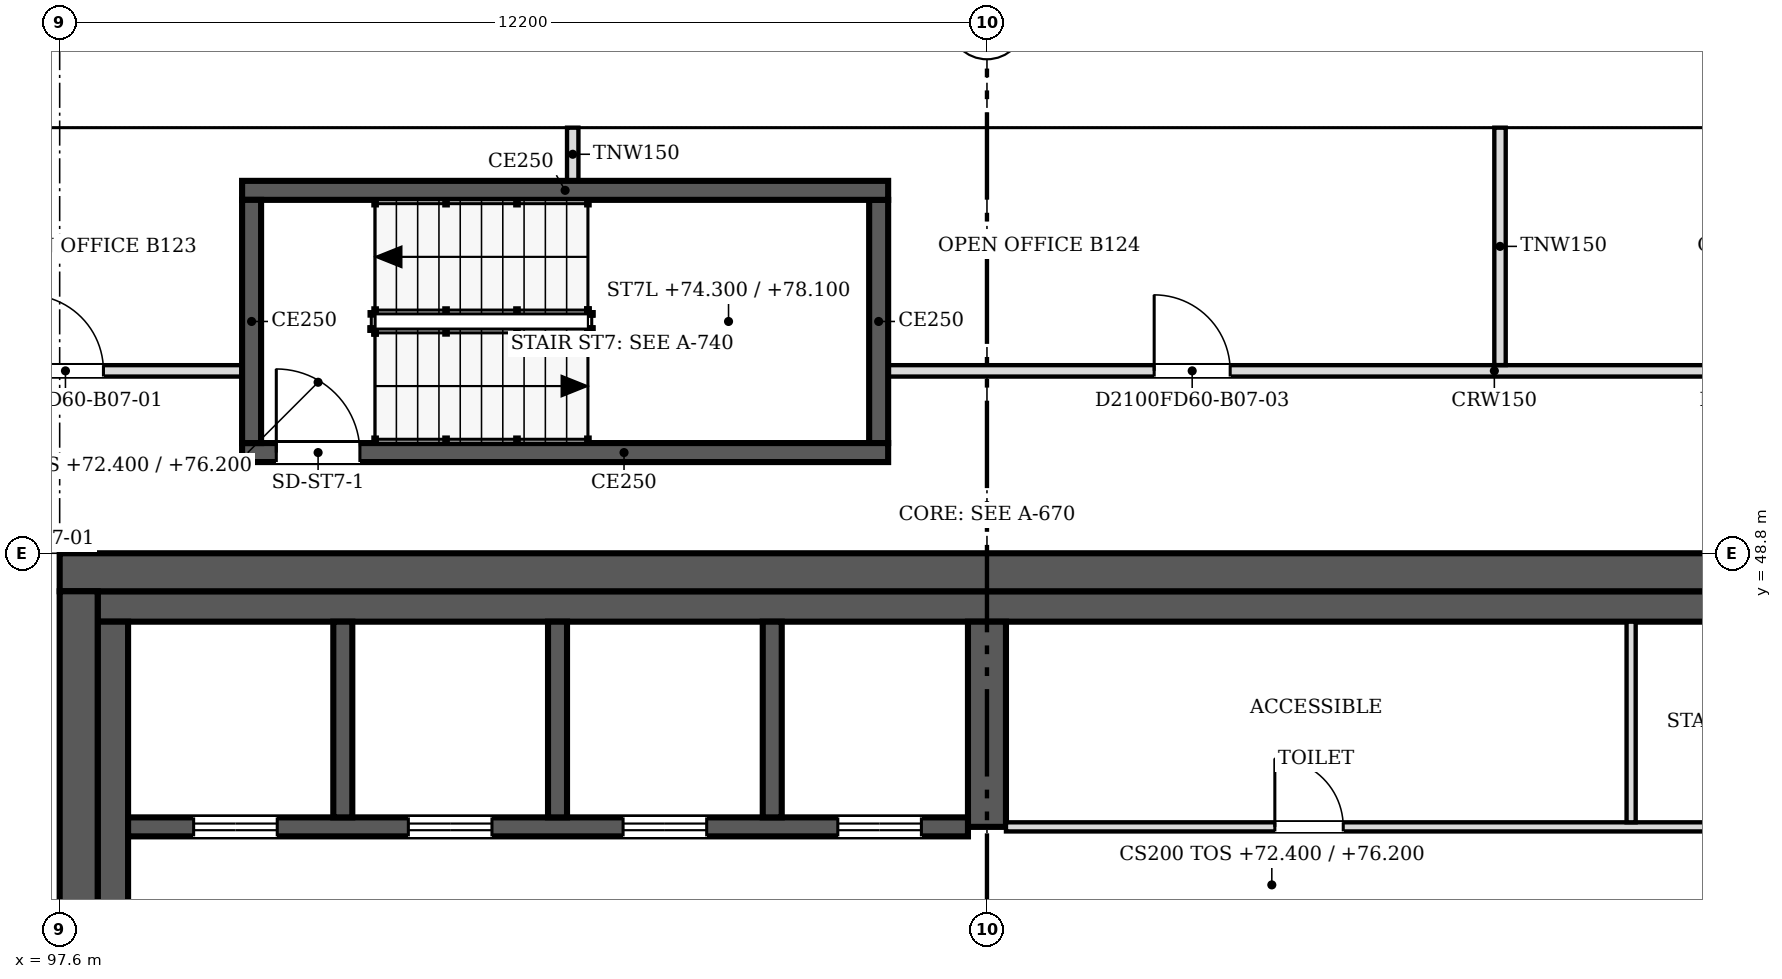
"""IFC4 building model, lengths in metres.
Left out: names, types, materials, properties, quantities, classifications, styles, units other than length and angle.
Written with IfcOpenShell. Run it as: python <this file> out.ifc"""

import sys

from ifc_helpers import new_model, si_unit, direction, frame, frame_2d, origin, place, context, subcontext, project, spatial, polyline, rectangle, outline, extrude, faceted_brep, source, transform, mapped, element, fill, save


model = new_model("IFC4")
c1 = context("Model", 3, precision=1e-05, world=origin(), true_north=direction((0.0, 1.0)))
c2 = subcontext(c1, "Body", "Model", "MODEL_VIEW")
j1 = project(units=[si_unit("LENGTHUNIT", "METRE"), si_unit("PLANEANGLEUNIT", "RADIAN")], contexts=[c1])
p1 = place(None, origin())
s1 = spatial("IfcSite", under=j1, at=p1, CompositionType="ELEMENT")
p2 = place(p1, origin())
s2 = spatial("IfcBuilding", under=s1, at=p2, CompositionType="ELEMENT")
p3 = place(p2, frame((0.0, 0.0, 72.4)))
s3 = spatial("IfcBuildingStorey", under=s2, at=p3, CompositionType="ELEMENT", Elevation=72.4)
m1 = source(origin(), c2, "Body", "SweptSolid", [
    extrude(outline(polyline([(3.05, 0.0), (6.1, 3.8), (3.05, 7.6), (0.0, 3.8), (3.05, 0.0)])), frame((0.0, 0.25, 0.0), z_axis=(0.0, -1.0, 0.0), x_axis=(1.0, 0.0, 0.0)), (0.0, 0.0, 1.0), 0.5),
])
p4 = place(p3, frame((122.0, 54.65, -3.8), z_axis=(0.0, 0.0, 1.0), x_axis=(-1.0, 0.0, 0.0)))
e1 = element("IfcWall", 1, at=p4, inside=s3, PredefinedType="SOLIDWALL", context=c2, shape_type="MappedRepresentation", body=[
    mapped(m1, transform((0.0, 0.0, 0.0), scale=1.0)),
])
m2 = source(origin(), c2, "Body", "SweptSolid", [
    extrude(outline(polyline([(3.05, 0.399), (5.78, 3.8), (3.05, 7.2), (0.321, 3.8), (3.05, 0.399)])), frame((0.0, 0.26, 0.0), z_axis=(0.0, -1.0, 0.0), x_axis=(1.0, 0.0, 0.0)), (0.0, 0.0, 1.0), 0.52),
])
p5 = place(p4, origin())
e2 = element("IfcOpeningElement", 2, at=p5, cuts=e1, PredefinedType="OPENING", context=c2, shape_type="MappedRepresentation", body=[
    mapped(m2, transform((0.0, 0.0, 0.0), scale=1.0)),
])
m3 = source(origin(), c2, "Body", "Brep", [
    faceted_brep([(3.05, -0.25, 0.0), (6.1, -0.25, 3.8), (6.1, -0.25, 3.8), (3.05, -0.25, 7.6), (0.0, -0.25, 3.8), (0.0, 0.25, 3.8), (3.05, 0.25, 7.6), (6.1, 0.25, 3.8), (6.1, 0.25, 3.8), (3.05, 0.25, 0.0)], [[[0, 1, 2, 3, 4]], [[5, 6, 7, 8, 9]], [[9, 8, 1, 0]], [[7, 6, 3, 2]], [[6, 5, 4, 3]], [[5, 9, 0, 4]], [[1, 8, 7, 2]]]),
])
p6 = place(p3, frame((115.9, 54.65, -3.8), z_axis=(0.0, 0.0, 1.0), x_axis=(-1.0, 0.0, 0.0)))
e3 = element("IfcWall", 3, at=p6, inside=s3, PredefinedType="SOLIDWALL", context=c2, shape_type="MappedRepresentation", body=[
    mapped(m3, transform((0.0, 0.0, 0.0), scale=1.0)),
])
p7 = place(p6, origin())
e4 = element("IfcOpeningElement", 4, at=p7, cuts=e3, PredefinedType="OPENING", context=c2, shape_type="MappedRepresentation", body=[
    mapped(m2, transform((0.0, 0.0, 0.0), scale=1.0)),
])
p8 = place(p3, frame((109.8, 54.65, -3.8), z_axis=(0.0, 0.0, 1.0), x_axis=(-1.0, 0.0, 0.0)))
e5 = element("IfcWall", 5, at=p8, inside=s3, PredefinedType="SOLIDWALL", context=c2, shape_type="MappedRepresentation", body=[
    mapped(m1, transform((0.0, 0.0, 0.0), scale=1.0)),
])
p9 = place(p8, origin())
e6 = element("IfcOpeningElement", 6, at=p9, cuts=e5, PredefinedType="OPENING", context=c2, shape_type="MappedRepresentation", body=[
    mapped(m2, transform((0.0, 0.0, 0.0), scale=1.0)),
])
p10 = place(p3, frame((103.7, 54.65, -3.8), z_axis=(0.0, 0.0, 1.0), x_axis=(-1.0, 0.0, 0.0)))
e7 = element("IfcWall", 7, at=p10, inside=s3, PredefinedType="SOLIDWALL", context=c2, shape_type="MappedRepresentation", body=[
    mapped(m3, transform((0.0, 0.0, 0.0), scale=1.0)),
])
p11 = place(p10, origin())
e8 = element("IfcOpeningElement", 8, at=p11, cuts=e7, PredefinedType="OPENING", context=c2, shape_type="MappedRepresentation", body=[
    mapped(m2, transform((0.0, 0.0, 0.0), scale=1.0)),
])
m4 = source(origin(), c2, "Body", "Brep", [
    faceted_brep([(3.05, -0.25, 0.0), (6.053, -0.25, 3.8), (3.05, -0.25, 7.6), (0.0, -0.25, 3.8), (0.0, 0.25, 3.8), (3.05, 0.25, 7.6), (6.007, 0.25, 3.859), (6.007, 0.25, 3.741), (3.05, 0.25, 0.0), (6.053, 0.0, 3.8)], [[[0, 1, 2, 3]], [[4, 5, 6, 7, 8]], [[8, 7, 9, 1, 0]], [[6, 5, 2, 1, 9]], [[5, 4, 3, 2]], [[4, 8, 0, 3]], [[9, 7, 6]]]),
])
p12 = place(p3, frame((97.6, 54.65, -3.8), z_axis=(0.0, 0.0, 1.0), x_axis=(-1.0, 0.0, 0.0)))
e9 = element("IfcWall", 9, at=p12, inside=s3, PredefinedType="SOLIDWALL", context=c2, shape_type="MappedRepresentation", body=[
    mapped(m4, transform((0.0, 0.0, 0.0), scale=1.0)),
])
m5 = source(origin(), c2, "Body", "SweptSolid", [
    extrude(outline(polyline([(3.049, 0.401), (5.735, 3.8), (3.049, 7.199), (0.321, 3.8), (3.049, 0.401)])), frame((0.0, 0.26, 0.0), z_axis=(0.0, -1.0, 0.0), x_axis=(1.0, 0.0, 0.0)), (0.0, 0.0, 1.0), 0.52),
])
p13 = place(p12, origin())
e10 = element("IfcOpeningElement", 10, at=p13, cuts=e9, PredefinedType="OPENING", context=c2, shape_type="MappedRepresentation", body=[
    mapped(m5, transform((0.0, 0.0, 0.0), scale=1.0)),
])
p14 = place(p2, frame((0.0, 0.0, 76.2)))
s4 = spatial("IfcBuildingStorey", under=s2, at=p14, CompositionType="ELEMENT", Elevation=76.2)
m6 = source(origin(), c2, "Body", "SweptSolid", [
    extrude(outline(polyline([(3.05, 0.0), (6.1, 3.8), (3.05, 7.6), (0.0, 3.8), (3.05, 0.0)])), frame((0.0, 0.25, 0.0), z_axis=(0.0, -1.0, 0.0), x_axis=(1.0, 0.0, 0.0)), (0.0, 0.0, 1.0), 0.5),
])
p15 = place(p14, frame((125.05, 54.65, -3.8), z_axis=(0.0, 0.0, 1.0), x_axis=(-1.0, 0.0, 0.0)))
e11 = element("IfcWall", 11, at=p15, inside=s4, PredefinedType="SOLIDWALL", context=c2, shape_type="MappedRepresentation", body=[
    mapped(m6, transform((0.0, 0.0, 0.0), scale=1.0)),
])
m7 = source(origin(), c2, "Body", "SweptSolid", [
    extrude(outline(polyline([(3.05, 0.399), (5.78, 3.8), (3.05, 7.201), (0.321, 3.8), (3.05, 0.399)])), frame((0.0, 0.26, 0.0), z_axis=(0.0, -1.0, 0.0), x_axis=(1.0, 0.0, 0.0)), (0.0, 0.0, 1.0), 0.52),
])
p16 = place(p15, origin())
e12 = element("IfcOpeningElement", 12, at=p16, cuts=e11, PredefinedType="OPENING", context=c2, shape_type="MappedRepresentation", body=[
    mapped(m7, transform((0.0, 0.0, 0.0), scale=1.0)),
])
m8 = source(origin(), c2, "Body", "Brep", [
    faceted_brep([(3.05, -0.25, 0.0), (6.1, -0.25, 3.8), (6.1, -0.25, 3.8), (3.05, -0.25, 7.6), (0.0, -0.25, 3.8), (0.0, 0.25, 3.8), (3.05, 0.25, 7.6), (6.1, 0.25, 3.8), (6.1, 0.25, 3.8), (3.05, 0.25, 0.0)], [[[0, 1, 2, 3, 4]], [[5, 6, 7, 8, 9]], [[9, 8, 1, 0]], [[7, 6, 3, 2]], [[6, 5, 4, 3]], [[5, 9, 0, 4]], [[1, 8, 7, 2]]]),
])
p17 = place(p14, frame((118.95, 54.65, -3.8), z_axis=(0.0, 0.0, 1.0), x_axis=(-1.0, 0.0, 0.0)))
e13 = element("IfcWall", 13, at=p17, inside=s4, PredefinedType="SOLIDWALL", context=c2, shape_type="MappedRepresentation", body=[
    mapped(m8, transform((0.0, 0.0, 0.0), scale=1.0)),
])
p18 = place(p17, origin())
e14 = element("IfcOpeningElement", 14, at=p18, cuts=e13, PredefinedType="OPENING", context=c2, shape_type="MappedRepresentation", body=[
    mapped(m7, transform((0.0, 0.0, 0.0), scale=1.0)),
])
p19 = place(p14, frame((112.85, 54.65, -3.8), z_axis=(0.0, 0.0, 1.0), x_axis=(-1.0, 0.0, 0.0)))
e15 = element("IfcWall", 15, at=p19, inside=s4, PredefinedType="SOLIDWALL", context=c2, shape_type="MappedRepresentation", body=[
    mapped(m6, transform((0.0, 0.0, 0.0), scale=1.0)),
])
p20 = place(p19, origin())
e16 = element("IfcOpeningElement", 16, at=p20, cuts=e15, PredefinedType="OPENING", context=c2, shape_type="MappedRepresentation", body=[
    mapped(m7, transform((0.0, 0.0, 0.0), scale=1.0)),
])
p21 = place(p14, frame((106.75, 54.65, -3.8), z_axis=(0.0, 0.0, 1.0), x_axis=(-1.0, 0.0, 0.0)))
e17 = element("IfcWall", 17, at=p21, inside=s4, PredefinedType="SOLIDWALL", context=c2, shape_type="MappedRepresentation", body=[
    mapped(m6, transform((0.0, 0.0, 0.0), scale=1.0)),
])
p22 = place(p21, origin())
e18 = element("IfcOpeningElement", 18, at=p22, cuts=e17, PredefinedType="OPENING", context=c2, shape_type="MappedRepresentation", body=[
    mapped(m7, transform((0.0, 0.0, 0.0), scale=1.0)),
])
p23 = place(p14, frame((100.65, 54.65, -3.8), z_axis=(0.0, 0.0, 1.0), x_axis=(-1.0, 0.0, 0.0)))
e19 = element("IfcWall", 19, at=p23, inside=s4, PredefinedType="SOLIDWALL", context=c2, shape_type="MappedRepresentation", body=[
    mapped(m8, transform((0.0, 0.0, 0.0), scale=1.0)),
])
p24 = place(p23, origin())
e20 = element("IfcOpeningElement", 20, at=p24, cuts=e19, PredefinedType="OPENING", context=c2, shape_type="MappedRepresentation", body=[
    mapped(m7, transform((0.0, 0.0, 0.0), scale=1.0)),
])
p25 = place(p3, frame((97.85, 37.1, 0.0), z_axis=(0.0, 0.0, 1.0), x_axis=(0.0, 1.0, 0.0)))
e21 = element("IfcWall", 21, at=p25, inside=s3, PredefinedType="SHEAR", context=c2, shape_type="SweptSolid", body=[
    extrude(rectangle(XDim=11.2, YDim=0.5, at=frame_2d((5.6, 0.0))), origin(), (0.0, 0.0, 1.0), 3.8),
])
m9 = source(origin(), c2, "Body", "SweptSolid", [
    extrude(rectangle(XDim=2.1, YDim=2.4, at=frame_2d((1.05, 1.2))), frame((0.0, 0.26, 0.0), z_axis=(0.0, -1.0, 0.0), x_axis=(1.0, 0.0, 0.0)), (0.0, 0.0, 1.0), 0.52),
])
p26 = place(p25, frame((4.7, 0.0, 0.0)))
e22 = element("IfcOpeningElement", 22, at=p26, cuts=e21, PredefinedType="OPENING", context=c2, shape_type="MappedRepresentation", body=[
    mapped(m9, transform((0.0, 0.0, 0.0), scale=1.0)),
])
p27 = place(p3, frame((97.6, 48.55, 0.0), z_axis=(0.0, 0.0, 1.0), x_axis=(1.0, 0.0, 0.0)))
e23 = element("IfcWall", 23, at=p27, inside=s3, PredefinedType="SHEAR", context=c2, shape_type="SweptSolid", body=[
    extrude(rectangle(XDim=24.4, YDim=0.5, at=frame_2d((12.2, 0.0))), origin(), (0.0, 0.0, 1.0), 3.8),
])
p28 = place(p3, frame((98.1, 48.1, 0.0), z_axis=(0.0, 0.0, 1.0), x_axis=(1.0, 0.0, 0.0)))
e24 = element("IfcWall", 24, at=p28, inside=s3, PredefinedType="SOLIDWALL", context=c2, shape_type="SweptSolid", body=[
    extrude(rectangle(XDim=23.4, YDim=0.4, at=frame_2d((11.7, 0.0))), origin(), (0.0, 0.0, 1.0), 3.8),
])
p29 = place(p3, frame((98.3, 43.9, 0.0), z_axis=(0.0, 0.0, 1.0), x_axis=(0.0, 1.0, 0.0)))
e25 = element("IfcWall", 25, at=p29, inside=s3, PredefinedType="SOLIDWALL", context=c2, shape_type="SweptSolid", body=[
    extrude(rectangle(XDim=4.0, YDim=0.4, at=frame_2d((2.0, 0.0))), origin(), (0.0, 0.0, 1.0), 3.8),
])
p30 = place(p3, frame((109.8, 45.2, 0.0), z_axis=(0.0, 0.0, 1.0), x_axis=(0.0, 1.0, 0.0)))
e26 = element("IfcWall", 26, at=p30, inside=s3, PredefinedType="SHEAR", context=c2, shape_type="SweptSolid", body=[
    extrude(rectangle(XDim=2.7, YDim=0.5, at=frame_2d((1.35, 0.0))), origin(), (0.0, 0.0, 1.0), 3.8),
])
p31 = place(p3, frame((109.55, 45.2, 0.0), z_axis=(0.0, 0.0, 1.0), x_axis=(-1.0, 0.0, 0.0)))
e27 = element("IfcWall", 27, at=p31, inside=s3, PredefinedType="SOLIDWALL", context=c2, shape_type="SweptSolid", body=[
    extrude(rectangle(XDim=11.05, YDim=0.25, at=frame_2d((5.525, 0.0))), origin(), (0.0, 0.0, 1.0), 3.8),
])
m10 = source(origin(), c2, "Body", "SweptSolid", [
    extrude(rectangle(XDim=1.1, YDim=2.1, at=frame_2d((0.55, 1.05))), frame((0.0, 0.135, 0.0), z_axis=(0.0, -1.0, 0.0), x_axis=(1.0, 0.0, 0.0)), (0.0, 0.0, 1.0), 0.27),
])
p32 = place(p31, frame((9.087, 0.0, 0.0)))
e28 = element("IfcOpeningElement", 28, at=p32, cuts=e27, PredefinedType="OPENING", context=c2, shape_type="MappedRepresentation", body=[
    mapped(m10, transform((0.0, 0.0, 0.0), scale=1.0)),
])
p33 = place(p31, frame((6.262, 0.0, 0.0)))
e29 = element("IfcOpeningElement", 29, at=p33, cuts=e27, PredefinedType="OPENING", context=c2, shape_type="MappedRepresentation", body=[
    mapped(m10, transform((0.0, 0.0, 0.0), scale=1.0)),
])
p34 = place(p31, frame((3.438, 0.0, 0.0)))
e30 = element("IfcOpeningElement", 30, at=p34, cuts=e27, PredefinedType="OPENING", context=c2, shape_type="MappedRepresentation", body=[
    mapped(m10, transform((0.0, 0.0, 0.0), scale=1.0)),
])
p35 = place(p31, frame((0.613, 0.0, 0.0)))
e31 = element("IfcOpeningElement", 31, at=p35, cuts=e27, PredefinedType="OPENING", context=c2, shape_type="MappedRepresentation", body=[
    mapped(m10, transform((0.0, 0.0, 0.0), scale=1.0)),
])
for number, where, z_axis, x_axis in (
    (32, (101.325, 45.325, 0.0), (0.0, 0.0, 1.0), (0.0, 1.0, 0.0)),
    (33, (104.15, 45.325, 0.0), (0.0, 0.0, 1.0), (0.0, 1.0, 0.0)),
    (34, (106.975, 45.325, 0.0), (0.0, 0.0, 1.0), (0.0, 1.0, 0.0)),
):
    element("IfcWall", number, at=place(p3, frame(where, z_axis=z_axis, x_axis=x_axis)), inside=s3, PredefinedType="SOLIDWALL", context=c2, shape_type="SweptSolid", body=[
        extrude(rectangle(XDim=2.575, YDim=0.25, at=frame_2d((1.288, 0.0))), origin(), (0.0, 0.0, 1.0), 3.8),
    ])
p36 = place(p3, frame((110.05, 45.2, 0.0), z_axis=(0.0, 0.0, 1.0), x_axis=(1.0, 0.0, 0.0)))
e35 = element("IfcWall", 35, at=p36, inside=s3, PredefinedType="PARTITIONING", context=c2, shape_type="SweptSolid", body=[
    extrude(rectangle(XDim=11.05, YDim=0.12, at=frame_2d((5.525, 0.0))), origin(), (0.0, 0.0, 1.0), 3.6),
])
m11 = source(origin(), c2, "Body", "SweptSolid", [
    extrude(rectangle(XDim=0.9, YDim=2.1, at=frame_2d((0.45, 1.05))), frame((0.0, 0.07, 0.0), z_axis=(0.0, -1.0, 0.0), x_axis=(1.0, 0.0, 0.0)), (0.0, 0.0, 1.0), 0.14),
])
p37 = place(p36, frame((3.538, 0.0, 0.0)))
e36 = element("IfcOpeningElement", 36, at=p37, cuts=e35, PredefinedType="OPENING", context=c2, shape_type="MappedRepresentation", body=[
    mapped(m11, transform((0.0, 0.0, 0.0), scale=1.0)),
])
p38 = place(p36, frame((9.188, 0.0, 0.0)))
e37 = element("IfcOpeningElement", 37, at=p38, cuts=e35, PredefinedType="OPENING", context=c2, shape_type="MappedRepresentation", body=[
    mapped(m11, transform((0.0, 0.0, 0.0), scale=1.0)),
])
p39 = place(p3, frame((118.275, 45.26, 0.0), z_axis=(0.0, 0.0, 1.0), x_axis=(0.0, 1.0, 0.0)))
e38 = element("IfcWall", 38, at=p39, inside=s3, PredefinedType="PARTITIONING", context=c2, shape_type="SweptSolid", body=[
    extrude(rectangle(XDim=2.64, YDim=0.12, at=frame_2d((1.32, 0.0))), origin(), (0.0, 0.0, 1.0), 3.6),
])
p40 = place(p3, frame((108.5, 50.125, 0.0), z_axis=(0.0, 0.0, 1.0), x_axis=(-1.0, 0.0, 0.0)))
e39 = element("IfcWall", 39, at=p40, inside=s3, PredefinedType="SOLIDWALL", context=c2, shape_type="SweptSolid", body=[
    extrude(rectangle(XDim=8.5, YDim=0.25, at=frame_2d((4.25, 0.0))), origin(), (0.0, 0.0, 1.0), 3.8),
])
p41 = place(p40, frame((6.95, 0.0, 0.0)))
e40 = element("IfcOpeningElement", 40, at=p41, cuts=e39, PredefinedType="OPENING", context=c2, shape_type="MappedRepresentation", body=[
    mapped(m10, transform((0.0, 0.0, 0.0), scale=1.0)),
])
p42 = place(p3, frame((100.125, 50.25, 0.0), z_axis=(0.0, 0.0, 1.0), x_axis=(0.0, 1.0, 0.0)))
e41 = element("IfcWall", 41, at=p42, inside=s3, PredefinedType="SOLIDWALL", context=c2, shape_type="SweptSolid", body=[
    extrude(rectangle(XDim=3.2, YDim=0.25, at=frame_2d((1.6, 0.0))), origin(), (0.0, 0.0, 1.0), 3.8),
])
p43 = place(p3, frame((100.0, 53.575, 0.0), z_axis=(0.0, 0.0, 1.0), x_axis=(1.0, 0.0, 0.0)))
e42 = element("IfcWall", 42, at=p43, inside=s3, PredefinedType="SOLIDWALL", context=c2, shape_type="SweptSolid", body=[
    extrude(rectangle(XDim=8.5, YDim=0.25, at=frame_2d((4.25, 0.0))), origin(), (0.0, 0.0, 1.0), 3.8),
])
p44 = place(p3, frame((108.375, 53.45, 0.0), z_axis=(0.0, 0.0, 1.0), x_axis=(0.0, -1.0, 0.0)))
e43 = element("IfcWall", 43, at=p44, inside=s3, PredefinedType="SOLIDWALL", context=c2, shape_type="SweptSolid", body=[
    extrude(rectangle(XDim=3.2, YDim=0.25, at=frame_2d((1.6, 0.0))), origin(), (0.0, 0.0, 1.0), 3.8),
])
p45 = place(p3, frame((95.276, 51.2, 0.0), z_axis=(0.0, 0.0, 1.0), x_axis=(1.0, 0.0, 0.0)))
e44 = element("IfcWall", 44, at=p45, inside=s3, PredefinedType="PARTITIONING", context=c2, shape_type="SweptSolid", body=[
    extrude(rectangle(XDim=4.724, YDim=0.15, at=frame_2d((2.362, 0.0))), origin(), (0.0, 0.0, 1.0), 3.067),
])
m12 = source(origin(), c2, "Body", "SweptSolid", [
    extrude(rectangle(XDim=1.0, YDim=2.1, at=frame_2d((0.5, 1.05))), frame((0.0, 0.085, 0.0), z_axis=(0.0, -1.0, 0.0), x_axis=(1.0, 0.0, 0.0)), (0.0, 0.0, 1.0), 0.17),
])
p46 = place(p45, frame((1.9, 0.0, 0.0)))
e45 = element("IfcOpeningElement", 45, at=p46, cuts=e44, PredefinedType="OPENING", context=c2, shape_type="MappedRepresentation", body=[
    mapped(m12, transform((0.0, 0.0, 0.0), scale=1.0)),
])
p47 = place(p3, frame((108.5, 51.2, 0.0), z_axis=(0.0, 0.0, 1.0), x_axis=(1.0, 0.0, 0.0)))
e46 = element("IfcWall", 46, at=p47, inside=s3, PredefinedType="PARTITIONING", context=c2, shape_type="SweptSolid", body=[
    extrude(rectangle(XDim=15.824, YDim=0.15, at=frame_2d((7.912, 0.0))), origin(), (0.0, 0.0, 1.0), 3.067),
])
p48 = place(p47, frame((11.451, 0.0, 0.0)))
e47 = element("IfcOpeningElement", 47, at=p48, cuts=e46, PredefinedType="OPENING", context=c2, shape_type="MappedRepresentation", body=[
    mapped(m12, transform((0.0, 0.0, 0.0), scale=1.0)),
])
p49 = place(p47, frame((3.5, 0.0, 0.0)))
e48 = element("IfcOpeningElement", 48, at=p49, cuts=e46, PredefinedType="OPENING", context=c2, shape_type="MappedRepresentation", body=[
    mapped(m12, transform((0.0, 0.0, 0.0), scale=1.0)),
])
p50 = place(p3, frame((116.55, 51.276, 0.0), z_axis=(0.0, 0.0, 1.0), x_axis=(0.0, 1.0, 0.0)))
e49 = element("IfcWall", 49, at=p50, inside=s3, PredefinedType="PARTITIONING", context=c2, shape_type="SweptSolid", body=[
    extrude(rectangle(XDim=3.124, YDim=0.15, at=frame_2d((1.562, 0.0))), origin(), (0.0, 0.0, 1.0), 3.067),
])
p51 = place(p3, frame((104.35, 53.7, 0.0), z_axis=(0.0, 0.0, 1.0), x_axis=(0.0, 1.0, 0.0)))
e50 = element("IfcWall", 50, at=p51, inside=s3, PredefinedType="PARTITIONING", context=c2, shape_type="SweptSolid", body=[
    extrude(rectangle(XDim=0.7, YDim=0.15, at=frame_2d((0.35, 0.0))), origin(), (0.0, 0.0, 1.0), 3.067),
])
m13 = source(origin(), c2, "Body", "SweptSolid", [
    extrude(rectangle(XDim=1.1, YDim=2.1, at=frame_2d((0.55, 1.05))), frame((0.0, 0.025, 0.0), z_axis=(0.0, -1.0, 0.0), x_axis=(1.0, 0.0, 0.0)), (0.0, 0.0, 1.0), 0.05),
])
p52 = place(p32, origin())
e51 = element("IfcDoor", 51, at=p52, inside=s3, OperationType="DOUBLE_DOOR_SLIDING", PredefinedType="DOOR", context=c2, shape_type="MappedRepresentation", body=[
    mapped(m13, transform((0.0, 0.0, 0.0), scale=1.0)),
])
fill(e28, e51)
p53 = place(p33, origin())
e52 = element("IfcDoor", 52, at=p53, inside=s3, OperationType="DOUBLE_DOOR_SLIDING", PredefinedType="DOOR", context=c2, shape_type="MappedRepresentation", body=[
    mapped(m13, transform((0.0, 0.0, 0.0), scale=1.0)),
])
fill(e29, e52)
p54 = place(p34, origin())
e53 = element("IfcDoor", 53, at=p54, inside=s3, OperationType="DOUBLE_DOOR_SLIDING", PredefinedType="DOOR", context=c2, shape_type="MappedRepresentation", body=[
    mapped(m13, transform((0.0, 0.0, 0.0), scale=1.0)),
])
fill(e30, e53)
p55 = place(p35, origin())
e54 = element("IfcDoor", 54, at=p55, inside=s3, OperationType="DOUBLE_DOOR_SLIDING", PredefinedType="DOOR", context=c2, shape_type="MappedRepresentation", body=[
    mapped(m13, transform((0.0, 0.0, 0.0), scale=1.0)),
])
fill(e31, e54)
m14 = source(origin(), c2, "Body", "SweptSolid", [
    extrude(rectangle(XDim=0.9, YDim=2.1, at=frame_2d((0.45, 1.05))), frame((0.0, 0.025, 0.0), z_axis=(0.0, -1.0, 0.0), x_axis=(1.0, 0.0, 0.0)), (0.0, 0.0, 1.0), 0.05),
])
p56 = place(p37, origin())
e55 = element("IfcDoor", 55, at=p56, inside=s3, OperationType="SINGLE_SWING_LEFT", PredefinedType="DOOR", context=c2, shape_type="MappedRepresentation", body=[
    mapped(m14, transform((0.0, 0.0, 0.0), scale=1.0)),
])
fill(e36, e55)
p57 = place(p41, origin())
e56 = element("IfcDoor", 56, at=p57, inside=s3, OperationType="SINGLE_SWING_RIGHT", PredefinedType="DOOR", context=c2, shape_type="MappedRepresentation", body=[
    mapped(m13, transform((0.0, 0.0, 0.0), scale=1.0)),
])
fill(e40, e56)
m15 = source(origin(), c2, "Body", "SweptSolid", [
    extrude(rectangle(XDim=1.0, YDim=2.1, at=frame_2d((0.5, 1.05))), frame((0.0, 0.025, 0.0), z_axis=(0.0, -1.0, 0.0), x_axis=(1.0, 0.0, 0.0)), (0.0, 0.0, 1.0), 0.05),
])
p58 = place(p46, origin())
e57 = element("IfcDoor", 57, at=p58, inside=s3, OperationType="SINGLE_SWING_LEFT", PredefinedType="DOOR", context=c2, shape_type="MappedRepresentation", body=[
    mapped(m15, transform((0.0, 0.0, 0.0), scale=1.0)),
])
fill(e45, e57)
p59 = place(p49, origin())
e58 = element("IfcDoor", 58, at=p59, inside=s3, OperationType="SINGLE_SWING_LEFT", PredefinedType="DOOR", context=c2, shape_type="MappedRepresentation", body=[
    mapped(m15, transform((0.0, 0.0, 0.0), scale=1.0)),
])
fill(e48, e58)
save(model, sys.argv[1])
